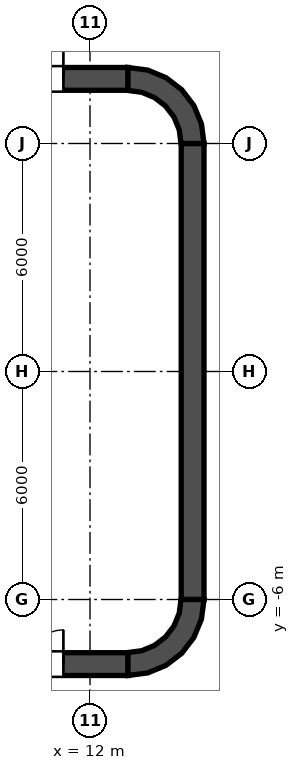
"""IFC4 building model, lengths in metres.
Left out: names, types, materials, properties, quantities, classifications, styles, units other than length and angle.
Written with IfcOpenShell. Run it as: python <this file> out.ifc"""

import sys

from ifc_helpers import new_model, si_unit, direction, frame, frame_2d, origin, place, context, subcontext, project, spatial, polyline, rectangle, outline, extrude, element, fill, save


model = new_model("IFC4")
c1 = context("Model", 3, precision=1e-05, world=origin(), true_north=direction((0.0, 1.0)))
c2 = subcontext(c1, "Body", "Model", "MODEL_VIEW")
j1 = project(units=[si_unit("LENGTHUNIT", "METRE"), si_unit("PLANEANGLEUNIT", "RADIAN")], contexts=[c1])
p1 = place(None, origin())
s1 = spatial("IfcSite", under=j1, at=p1, CompositionType="ELEMENT")
p2 = place(p1, origin())
s2 = spatial("IfcBuilding", under=s1, at=p2, CompositionType="ELEMENT")
p3 = place(p2, frame((0.0, 0.0, 114.6)))
s3 = spatial("IfcBuildingStorey", under=s2, at=p3, CompositionType="ELEMENT", Elevation=114.6)
p4 = place(p3, frame((-13.0, 7.7, 0.0), z_axis=(0.0, 0.0, 1.0), x_axis=(1.0, 0.0, 0.0)))
e1 = element("IfcWall", 1, at=p4, inside=s3, PredefinedType="SHEAR", context=c2, shape_type="SweptSolid", body=[
    extrude(rectangle(XDim=26.0, YDim=0.6, at=frame_2d((13.0, 0.0))), origin(), (0.0, 0.0, 1.0), 4.2),
])
p5 = place(p4, frame((1.7, 0.0, 0.0)))
e2 = element("IfcOpeningElement", 2, at=p5, cuts=e1, PredefinedType="OPENING", context=c2, shape_type="SweptSolid", body=[
    extrude(rectangle(XDim=1.8, YDim=2.1, at=frame_2d((0.9, 1.05))), frame((0.0, 0.3, 0.0), z_axis=(0.0, -1.0, 0.0), x_axis=(1.0, 0.0, 0.0)), (0.0, 0.0, 1.0), 0.6),
])
p6 = place(p4, frame((22.5, 0.0, 0.0)))
e3 = element("IfcOpeningElement", 3, at=p6, cuts=e1, PredefinedType="OPENING", context=c2, shape_type="SweptSolid", body=[
    extrude(rectangle(XDim=1.8, YDim=2.1, at=frame_2d((0.9, 1.05))), frame((0.0, 0.3, 0.0), z_axis=(0.0, -1.0, 0.0), x_axis=(1.0, 0.0, 0.0)), (0.0, 0.0, 1.0), 0.6),
])
p7 = place(p3, frame((-13.0, -7.7, 0.0), z_axis=(0.0, 0.0, 1.0), x_axis=(1.0, 0.0, 0.0)))
e4 = element("IfcWall", 4, at=p7, inside=s3, PredefinedType="SHEAR", context=c2, shape_type="SweptSolid", body=[
    extrude(rectangle(XDim=26.0, YDim=0.6, at=frame_2d((13.0, 0.0))), origin(), (0.0, 0.0, 1.0), 4.2),
])
p8 = place(p7, frame((1.7, 0.0, 0.0)))
e5 = element("IfcOpeningElement", 5, at=p8, cuts=e4, PredefinedType="OPENING", context=c2, shape_type="SweptSolid", body=[
    extrude(rectangle(XDim=1.8, YDim=2.1, at=frame_2d((0.9, 1.05))), frame((0.0, 0.3, 0.0), z_axis=(0.0, -1.0, 0.0), x_axis=(1.0, 0.0, 0.0)), (0.0, 0.0, 1.0), 0.6),
])
p9 = place(p7, frame((22.5, 0.0, 0.0)))
e6 = element("IfcOpeningElement", 6, at=p9, cuts=e4, PredefinedType="OPENING", context=c2, shape_type="SweptSolid", body=[
    extrude(rectangle(XDim=1.8, YDim=2.1, at=frame_2d((0.9, 1.05))), frame((0.0, 0.3, 0.0), z_axis=(0.0, -1.0, 0.0), x_axis=(1.0, 0.0, 0.0)), (0.0, 0.0, 1.0), 0.6),
])
p10 = place(p3, frame((14.7, -6.0, 0.0), z_axis=(0.0, 0.0, 1.0), x_axis=(0.0, 1.0, 0.0)))
e7 = element("IfcWall", 7, at=p10, inside=s3, PredefinedType="SHEAR", context=c2, shape_type="SweptSolid", body=[
    extrude(rectangle(XDim=12.0, YDim=0.6, at=frame_2d((6.0, 0.0))), origin(), (0.0, 0.0, 1.0), 4.2),
])
p11 = place(p3, origin())
e8 = element("IfcWall", 8, at=p11, inside=s3, PredefinedType="SHEAR", context=c2, shape_type="SweptSolid", body=[
    extrude(outline(polyline([(13.0, 8.0), (13.0, 7.395), (13.361, 7.347), (13.698, 7.208), (13.986, 6.986), (14.208, 6.698), (14.347, 6.361), (14.395, 6.0), (15.0, 6.0), (14.932, 6.518), (14.732, 7.0), (14.414, 7.414), (14.0, 7.732), (13.518, 7.932), (13.0, 8.0)])), origin(), (0.0, 0.0, 1.0), 4.2),
])
e9 = element("IfcWall", 9, at=p11, inside=s3, PredefinedType="SHEAR", context=c2, shape_type="SweptSolid", body=[
    extrude(outline(polyline([(15.0, -6.0), (14.395, -6.0), (14.347, -6.361), (14.208, -6.698), (13.986, -6.986), (13.698, -7.208), (13.361, -7.347), (13.0, -7.395), (13.0, -8.0), (13.518, -7.932), (14.0, -7.732), (14.414, -7.414), (14.732, -7.0), (14.932, -6.518), (15.0, -6.0)])), origin(), (0.0, 0.0, 1.0), 4.2),
])
p12 = place(p3, frame((11.8, -7.4, 0.0), z_axis=(0.0, 0.0, 1.0), x_axis=(0.0, 1.0, 0.0)))
e10 = element("IfcWall", 10, at=p12, inside=s3, PredefinedType="SOLIDWALL", context=c2, shape_type="SweptSolid", body=[
    extrude(rectangle(XDim=14.8, YDim=0.4, at=frame_2d((7.4, 0.0))), origin(), (0.0, 0.0, 1.0), 4.05),
])
p13 = place(p12, frame((11.2, 0.0, 0.0)))
e11 = element("IfcOpeningElement", 11, at=p13, cuts=e10, PredefinedType="OPENING", context=c2, shape_type="SweptSolid", body=[
    extrude(rectangle(XDim=1.1, YDim=2.1, at=frame_2d((0.55, 1.05))), frame((0.0, 0.2, 0.0), z_axis=(0.0, -1.0, 0.0), x_axis=(1.0, 0.0, 0.0)), (0.0, 0.0, 1.0), 0.4),
])
p14 = place(p12, frame((8.3, 0.0, 0.0)))
e12 = element("IfcOpeningElement", 12, at=p14, cuts=e10, PredefinedType="OPENING", context=c2, shape_type="SweptSolid", body=[
    extrude(rectangle(XDim=1.1, YDim=2.1, at=frame_2d((0.55, 1.05))), frame((0.0, 0.2, 0.0), z_axis=(0.0, -1.0, 0.0), x_axis=(1.0, 0.0, 0.0)), (0.0, 0.0, 1.0), 0.4),
])
p15 = place(p12, frame((5.4, 0.0, 0.0)))
e13 = element("IfcOpeningElement", 13, at=p15, cuts=e10, PredefinedType="OPENING", context=c2, shape_type="SweptSolid", body=[
    extrude(rectangle(XDim=1.1, YDim=2.1, at=frame_2d((0.55, 1.05))), frame((0.0, 0.2, 0.0), z_axis=(0.0, -1.0, 0.0), x_axis=(1.0, 0.0, 0.0)), (0.0, 0.0, 1.0), 0.4),
])
p16 = place(p12, frame((13.552, 0.0, 0.0)))
e14 = element("IfcOpeningElement", 14, at=p16, cuts=e10, PredefinedType="OPENING", context=c2, shape_type="SweptSolid", body=[
    extrude(rectangle(XDim=0.9, YDim=2.1, at=frame_2d((0.45, 1.05))), frame((0.0, 0.2, 0.0), z_axis=(0.0, -1.0, 0.0), x_axis=(1.0, 0.0, 0.0)), (0.0, 0.0, 1.0), 0.4),
])
p17 = place(p12, frame((0.347, 0.0, 0.0)))
e15 = element("IfcOpeningElement", 15, at=p17, cuts=e10, PredefinedType="OPENING", context=c2, shape_type="SweptSolid", body=[
    extrude(rectangle(XDim=0.9, YDim=2.1, at=frame_2d((0.45, 1.05))), frame((0.0, 0.2, 0.0), z_axis=(0.0, -1.0, 0.0), x_axis=(1.0, 0.0, 0.0)), (0.0, 0.0, 1.0), 0.4),
])
e16 = element("IfcWall", 16, at=p11, inside=s3, PredefinedType="SOLIDWALL", context=c2, shape_type="SweptSolid", body=[
    extrude(outline(polyline([(12.0, -5.675), (12.0, -5.925), (14.15, -5.925), (14.4, -5.925), (14.4, -5.675), (14.4, -3.025), (14.4, -2.775), (14.4, -0.125), (14.4, 0.125), (14.4, 2.775), (14.4, 3.025), (14.4, 5.675), (14.4, 5.925), (14.15, 5.925), (12.0, 5.925), (12.0, 5.675), (14.15, 5.675), (14.15, 3.025), (12.0, 3.025), (12.0, 2.775), (14.15, 2.775), (14.15, 0.125), (12.0, 0.125), (12.0, -0.125), (14.15, -0.125), (14.15, -2.775), (12.0, -2.775), (12.0, -3.025), (14.15, -3.025), (14.15, -5.675), (12.0, -5.675)])), origin(), (0.0, 0.0, 1.0), 4.05),
])
p18 = place(p13, origin())
e17 = element("IfcDoor", 17, at=p18, inside=s3, OperationType="DOUBLE_DOOR_SLIDING", PredefinedType="DOOR", context=c2, shape_type="SweptSolid", body=[
    extrude(rectangle(XDim=1.1, YDim=2.1, at=frame_2d((0.55, 1.05))), frame((0.0, 0.025, 0.0), z_axis=(0.0, -1.0, 0.0), x_axis=(1.0, 0.0, 0.0)), (0.0, 0.0, 1.0), 0.05),
])
fill(e11, e17)
p19 = place(p14, origin())
e18 = element("IfcDoor", 18, at=p19, inside=s3, OperationType="DOUBLE_DOOR_SLIDING", PredefinedType="DOOR", context=c2, shape_type="SweptSolid", body=[
    extrude(rectangle(XDim=1.1, YDim=2.1, at=frame_2d((0.55, 1.05))), frame((0.0, 0.025, 0.0), z_axis=(0.0, -1.0, 0.0), x_axis=(1.0, 0.0, 0.0)), (0.0, 0.0, 1.0), 0.05),
])
fill(e12, e18)
p20 = place(p15, origin())
e19 = element("IfcDoor", 19, at=p20, inside=s3, OperationType="DOUBLE_DOOR_SLIDING", PredefinedType="DOOR", context=c2, shape_type="SweptSolid", body=[
    extrude(rectangle(XDim=1.1, YDim=2.1, at=frame_2d((0.55, 1.05))), frame((0.0, 0.025, 0.0), z_axis=(0.0, -1.0, 0.0), x_axis=(1.0, 0.0, 0.0)), (0.0, 0.0, 1.0), 0.05),
])
fill(e13, e19)
p21 = place(p16, origin())
e20 = element("IfcDoor", 20, at=p21, inside=s3, OperationType="SINGLE_SWING_RIGHT", PredefinedType="DOOR", context=c2, shape_type="SweptSolid", body=[
    extrude(rectangle(XDim=0.9, YDim=2.1, at=frame_2d((0.45, 1.05))), frame((0.0, 0.025, 0.0), z_axis=(0.0, -1.0, 0.0), x_axis=(1.0, 0.0, 0.0)), (0.0, 0.0, 1.0), 0.05),
])
fill(e14, e20)
p22 = place(p17, origin())
e21 = element("IfcDoor", 21, at=p22, inside=s3, OperationType="SINGLE_SWING_RIGHT", PredefinedType="DOOR", context=c2, shape_type="SweptSolid", body=[
    extrude(rectangle(XDim=0.9, YDim=2.1, at=frame_2d((0.45, 1.05))), frame((0.0, 0.025, 0.0), z_axis=(0.0, -1.0, 0.0), x_axis=(1.0, 0.0, 0.0)), (0.0, 0.0, 1.0), 0.05),
])
fill(e15, e21)
p23 = place(p6, origin())
e22 = element("IfcDoor", 22, at=p23, inside=s3, OperationType="DOUBLE_DOOR_SINGLE_SWING", PredefinedType="DOOR", context=c2, shape_type="SweptSolid", body=[
    extrude(rectangle(XDim=1.8, YDim=2.1, at=frame_2d((0.9, 1.05))), frame((0.0, 0.025, 0.0), z_axis=(0.0, -1.0, 0.0), x_axis=(1.0, 0.0, 0.0)), (0.0, 0.0, 1.0), 0.05),
])
fill(e3, e22)
p24 = place(p9, origin())
e23 = element("IfcDoor", 23, at=p24, inside=s3, OperationType="DOUBLE_DOOR_SINGLE_SWING", PredefinedType="DOOR", context=c2, shape_type="SweptSolid", body=[
    extrude(rectangle(XDim=1.8, YDim=2.1, at=frame_2d((0.9, 1.05))), frame((0.0, 0.025, 0.0), z_axis=(0.0, -1.0, 0.0), x_axis=(1.0, 0.0, 0.0)), (0.0, 0.0, 1.0), 0.05),
])
fill(e6, e23)
save(model, sys.argv[1])
